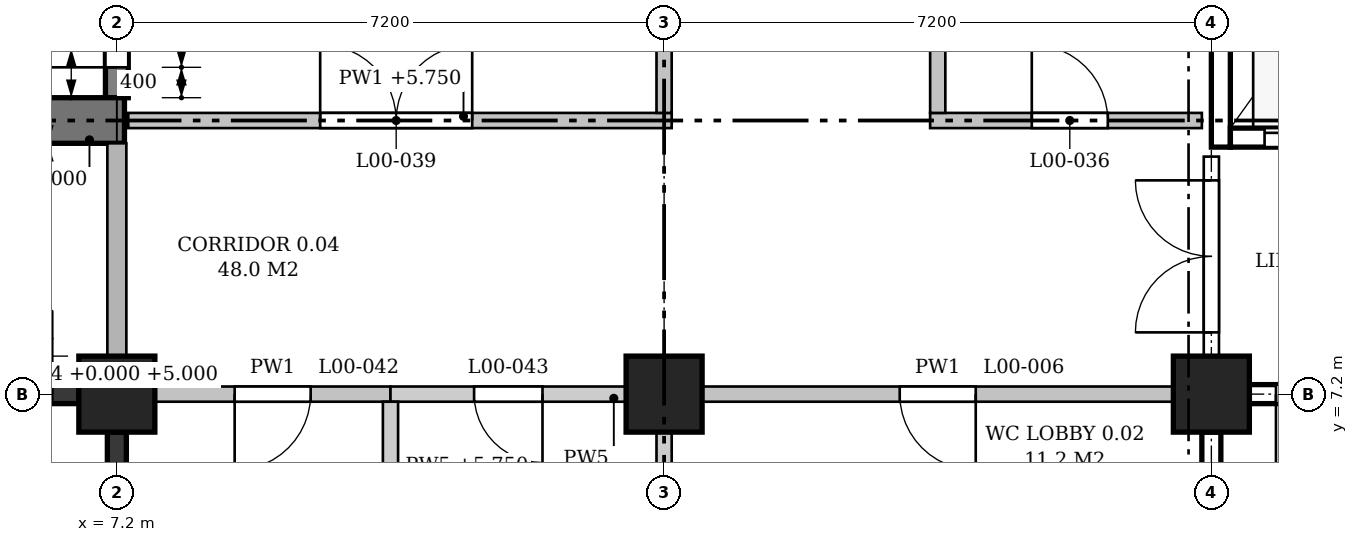
"""IFC4 building model, lengths in metres.
Left out: names, types, materials, properties, quantities, classifications, styles, units other than length and angle.
Written with IfcOpenShell. Run it as: python <this file> out.ifc"""

import sys

from ifc_helpers import new_model, si_unit, direction, frame, frame_2d, origin, origin_2d, place, context, subcontext, project, spatial, polyline, rectangle, outline, extrude, element, fill, save


model = new_model("IFC4")
c1 = context("Model", 3, precision=1e-05, world=origin(), true_north=direction((0.0, 1.0)))
c2 = subcontext(c1, "Body", "Model", "MODEL_VIEW")
j1 = project(units=[si_unit("LENGTHUNIT", "METRE"), si_unit("PLANEANGLEUNIT", "RADIAN")], contexts=[c1])
p1 = place(None, origin())
s1 = spatial("IfcSite", under=j1, at=p1, CompositionType="ELEMENT")
p2 = place(p1, origin())
s2 = spatial("IfcBuilding", under=s1, at=p2, CompositionType="ELEMENT")
p3 = place(p2, origin())
s3 = spatial("IfcBuildingStorey", under=s2, at=p3, CompositionType="ELEMENT", Elevation=0.0)
for number, where, z_axis, x_axis in (
    (1, (7.2, 7.2, 0.0), (0.0, 0.0, 1.0), (1.0, 0.0, 0.0)),
    (2, (14.4, 7.2, 0.0), (0.0, 0.0, 1.0), (1.0, 0.0, 0.0)),
    (3, (21.6, 7.2, 0.0), (0.0, 0.0, 1.0), (1.0, 0.0, 0.0)),
):
    element("IfcColumn", number, at=place(p3, frame(where, z_axis=z_axis, x_axis=x_axis)), inside=s3, PredefinedType="COLUMN", context=c2, shape_type="SweptSolid", body=[
        extrude(rectangle(XDim=1.0, YDim=1.0, at=origin_2d()), origin(), (0.0, 0.0, 1.0), 6.0),
    ])
p4 = place(p3, frame((7.2, 11.1, 0.0), z_axis=(0.0, 0.0, 1.0), x_axis=(0.0, 1.0, 0.0)))
e4 = element("IfcWall", 4, at=p4, inside=s3, PredefinedType="STANDARD", context=c2, shape_type="SweptSolid", body=[
    extrude(rectangle(XDim=2.8, YDim=0.3, at=frame_2d((1.4, 0.0))), origin(), (0.0, 0.0, 1.0), 5.0),
])
p5 = place(p4, frame((0.4, 0.0, 0.0)))
e5 = element("IfcOpeningElement", 5, at=p5, cuts=e4, PredefinedType="OPENING", context=c2, shape_type="SweptSolid", body=[
    extrude(outline(polyline([(0.0, 0.0), (2.0, 0.0), (2.0, 1.9), (1.0, 2.9), (0.0, 1.9), (0.0, 0.0)])), frame((0.0, 0.16, 0.0), z_axis=(0.0, -1.0, 0.0), x_axis=(1.0, 0.0, 0.0)), (0.0, 0.0, 1.0), 0.32),
])
p6 = place(p4, frame((0.65, 0.0, 3.15)))
e6 = element("IfcOpeningElement", 6, at=p6, cuts=e4, PredefinedType="OPENING", context=c2, shape_type="SweptSolid", body=[
    extrude(outline(polyline([(0.0, 0.0), (1.5, 0.0), (1.5, 1.05), (0.75, 1.8), (0.0, 1.05), (0.0, 0.0)])), frame((0.0, 0.16, 0.0), z_axis=(0.0, -1.0, 0.0), x_axis=(1.0, 0.0, 0.0)), (0.0, 0.0, 1.0), 0.32),
])
p7 = place(p3, frame((7.3, 10.8, 0.0), z_axis=(0.0, 0.0, 1.0), x_axis=(-1.0, 0.0, 0.0)))
e7 = element("IfcWall", 7, at=p7, inside=s3, PredefinedType="POLYGONAL", context=c2, shape_type="SweptSolid", body=[
    extrude(outline(polyline([(1.0, 0.0), (1.0, 5.25), (0.5, 6.0), (0.35, 6.0), (0.35, 5.0), (0.0, 5.0), (0.0, 0.0), (1.0, 0.0)])), frame((0.0, 0.3, 0.0), z_axis=(0.0, -1.0, 0.0), x_axis=(1.0, 0.0, 0.0)), (0.0, 0.0, 1.0), 0.6),
])
p8 = place(p3, frame((0.6, 7.2, 0.0), z_axis=(0.0, 0.0, 1.0), x_axis=(1.0, 0.0, 0.0)))
e8 = element("IfcWall", 8, at=p8, inside=s3, PredefinedType="SHEAR", context=c2, shape_type="SweptSolid", body=[
    extrude(rectangle(XDim=6.1, YDim=0.25, at=frame_2d((3.05, 0.0))), origin(), (0.0, 0.0, 1.0), 5.0),
])
p9 = place(p8, frame((4.65, 0.0, 0.0)))
e9 = element("IfcOpeningElement", 9, at=p9, cuts=e8, PredefinedType="OPENING", context=c2, shape_type="SweptSolid", body=[
    extrude(rectangle(XDim=1.1, YDim=2.1, at=frame_2d((0.55, 1.05))), frame((0.0, 0.135, 0.0), z_axis=(0.0, -1.0, 0.0), x_axis=(1.0, 0.0, 0.0)), (0.0, 0.0, 1.0), 0.27),
])
p10 = place(p3, frame((7.2, 0.5, 0.0), z_axis=(0.0, 0.0, 1.0), x_axis=(0.0, 1.0, 0.0)))
e10 = element("IfcWall", 10, at=p10, inside=s3, PredefinedType="SHEAR", context=c2, shape_type="SweptSolid", body=[
    extrude(rectangle(XDim=6.2, YDim=0.25, at=frame_2d((3.1, 0.0))), origin(), (0.0, 0.0, 1.0), 5.0),
])
p11 = place(p3, frame((22.1, 7.2, 0.0), z_axis=(0.0, 0.0, 1.0), x_axis=(1.0, 0.0, 0.0)))
e11 = element("IfcWall", 11, at=p11, inside=s3, PredefinedType="SHEAR", context=c2, shape_type="SweptSolid", body=[
    extrude(rectangle(XDim=6.2, YDim=0.25, at=frame_2d((3.1, 0.0))), origin(), (0.0, 0.0, 1.0), 5.0),
])
p12 = place(p11, frame((0.35, 0.0, 0.0)))
e12 = element("IfcOpeningElement", 12, at=p12, cuts=e11, PredefinedType="OPENING", context=c2, shape_type="SweptSolid", body=[
    extrude(rectangle(XDim=1.1, YDim=2.1, at=frame_2d((0.55, 1.05))), frame((0.0, 0.135, 0.0), z_axis=(0.0, -1.0, 0.0), x_axis=(1.0, 0.0, 0.0)), (0.0, 0.0, 1.0), 0.27),
])
p13 = place(p3, frame((21.6, 0.5, 0.0), z_axis=(0.0, 0.0, 1.0), x_axis=(0.0, 1.0, 0.0)))
e13 = element("IfcWall", 13, at=p13, inside=s3, PredefinedType="SHEAR", context=c2, shape_type="SweptSolid", body=[
    extrude(rectangle(XDim=6.2, YDim=0.25, at=frame_2d((3.1, 0.0))), origin(), (0.0, 0.0, 1.0), 5.0),
])
p14 = place(p3, frame((21.725, 10.45, -0.3), z_axis=(0.0, 0.0, 1.0), x_axis=(0.0, 1.0, 0.0)))
e14 = element("IfcWall", 14, at=p14, inside=s3, PredefinedType="SHEAR", context=c2, shape_type="SweptSolid", body=[
    extrude(rectangle(XDim=3.45, YDim=0.25, at=frame_2d((1.725, 0.0))), origin(), (0.0, 0.0, 1.0), 5.3),
])
p15 = place(p3, frame((21.85, 10.575, -0.3), z_axis=(0.0, 0.0, 1.0), x_axis=(1.0, 0.0, 0.0)))
e15 = element("IfcWall", 15, at=p15, inside=s3, PredefinedType="SHEAR", context=c2, shape_type="SweptSolid", body=[
    extrude(rectangle(XDim=2.0, YDim=0.25, at=frame_2d((1.0, 0.0))), origin(), (0.0, 0.0, 1.0), 6.05),
])
p16 = place(p15, frame((0.45, 0.0, 0.3)))
e16 = element("IfcOpeningElement", 16, at=p16, cuts=e15, PredefinedType="OPENING", context=c2, shape_type="SweptSolid", body=[
    extrude(rectangle(XDim=1.1, YDim=2.1, at=frame_2d((0.55, 1.05))), frame((0.0, 0.135, 0.0), z_axis=(0.0, -1.0, 0.0), x_axis=(1.0, 0.0, 0.0)), (0.0, 0.0, 1.0), 0.27),
])
p17 = place(p3, frame((7.7, 7.2, 0.0), z_axis=(0.0, 0.0, 1.0), x_axis=(1.0, 0.0, 0.0)))
e17 = element("IfcWall", 17, at=p17, inside=s3, PredefinedType="PARTITIONING", context=c2, shape_type="SweptSolid", body=[
    extrude(rectangle(XDim=3.1, YDim=0.2, at=frame_2d((1.55, 0.0))), origin(), (0.0, 0.0, 1.0), 5.0),
])
p18 = place(p17, frame((1.05, 0.0, 0.0)))
e18 = element("IfcOpeningElement", 18, at=p18, cuts=e17, PredefinedType="OPENING", context=c2, shape_type="SweptSolid", body=[
    extrude(rectangle(XDim=1.0, YDim=2.1, at=frame_2d((0.5, 1.05))), frame((0.0, 0.11, 0.0), z_axis=(0.0, -1.0, 0.0), x_axis=(1.0, 0.0, 0.0)), (0.0, 0.0, 1.0), 0.22),
])
p19 = place(p3, frame((10.8, 7.2, 0.0), z_axis=(0.0, 0.0, 1.0), x_axis=(1.0, 0.0, 0.0)))
e19 = element("IfcWall", 19, at=p19, inside=s3, PredefinedType="SOLIDWALL", context=c2, shape_type="SweptSolid", body=[
    extrude(rectangle(XDim=3.1, YDim=0.2, at=frame_2d((1.55, 0.0))), origin(), (0.0, 0.0, 1.0), 5.0),
])
p20 = place(p19, frame((1.1, 0.0, 0.0)))
e20 = element("IfcOpeningElement", 20, at=p20, cuts=e19, PredefinedType="OPENING", context=c2, shape_type="SweptSolid", body=[
    extrude(rectangle(XDim=0.9, YDim=2.1, at=frame_2d((0.45, 1.05))), frame((0.0, 0.11, 0.0), z_axis=(0.0, -1.0, 0.0), x_axis=(1.0, 0.0, 0.0)), (0.0, 0.0, 1.0), 0.22),
])
p21 = place(p3, frame((14.9, 7.2, 0.0), z_axis=(0.0, 0.0, 1.0), x_axis=(1.0, 0.0, 0.0)))
e21 = element("IfcWall", 21, at=p21, inside=s3, PredefinedType="PARTITIONING", context=c2, shape_type="SweptSolid", body=[
    extrude(rectangle(XDim=6.2, YDim=0.2, at=frame_2d((3.1, 0.0))), origin(), (0.0, 0.0, 1.0), 5.0),
])
p22 = place(p21, frame((2.6, 0.0, 0.0)))
e22 = element("IfcOpeningElement", 22, at=p22, cuts=e21, PredefinedType="OPENING", context=c2, shape_type="SweptSolid", body=[
    extrude(rectangle(XDim=1.0, YDim=2.1, at=frame_2d((0.5, 1.05))), frame((0.0, 0.11, 0.0), z_axis=(0.0, -1.0, 0.0), x_axis=(1.0, 0.0, 0.0)), (0.0, 0.0, 1.0), 0.22),
])
p23 = place(p3, frame((7.35, 10.8, 0.0), z_axis=(0.0, 0.0, 1.0), x_axis=(1.0, 0.0, 0.0)))
e23 = element("IfcWall", 23, at=p23, inside=s3, PredefinedType="PARTITIONING", context=c2, shape_type="SweptSolid", body=[
    extrude(outline(polyline([(0.0, 0.0), (7.15, 0.0), (7.15, 5.0), (6.8, 5.0), (6.8, 5.75), (0.1, 5.75), (0.1, 5.0), (0.0, 5.0), (0.0, 0.0)])), frame((0.0, 0.1, 0.0), z_axis=(0.0, -1.0, 0.0), x_axis=(1.0, 0.0, 0.0)), (0.0, 0.0, 1.0), 0.2),
])
p24 = place(p23, frame((2.525, 0.0, 0.0)))
e24 = element("IfcOpeningElement", 24, at=p24, cuts=e23, PredefinedType="OPENING", context=c2, shape_type="SweptSolid", body=[
    extrude(rectangle(XDim=2.0, YDim=2.1, at=frame_2d((1.0, 1.05))), frame((0.0, 0.11, 0.0), z_axis=(0.0, -1.0, 0.0), x_axis=(1.0, 0.0, 0.0)), (0.0, 0.0, 1.0), 0.22),
])
p25 = place(p3, frame((17.9, 10.8, 0.0), z_axis=(0.0, 0.0, 1.0), x_axis=(1.0, 0.0, 0.0)))
e25 = element("IfcWall", 25, at=p25, inside=s3, PredefinedType="PARTITIONING", context=c2, shape_type="SweptSolid", body=[
    extrude(outline(polyline([(0.0, 0.0), (3.575, 0.0), (3.575, 5.0), (3.45, 5.0), (3.45, 5.75), (0.0, 5.75), (0.0, 0.0)])), frame((0.0, 0.1, 0.0), z_axis=(0.0, -1.0, 0.0), x_axis=(1.0, 0.0, 0.0)), (0.0, 0.0, 1.0), 0.2),
])
p26 = place(p25, frame((1.338, 0.0, 0.0)))
e26 = element("IfcOpeningElement", 26, at=p26, cuts=e25, PredefinedType="OPENING", context=c2, shape_type="SweptSolid", body=[
    extrude(rectangle(XDim=1.0, YDim=2.1, at=frame_2d((0.5, 1.05))), frame((0.0, 0.11, 0.0), z_axis=(0.0, -1.0, 0.0), x_axis=(1.0, 0.0, 0.0)), (0.0, 0.0, 1.0), 0.22),
])
p27 = place(p3, frame((10.8, 5.4, 0.0), z_axis=(0.0, 0.0, 1.0), x_axis=(0.0, 1.0, 0.0)))
e27 = element("IfcWall", 27, at=p27, inside=s3, PredefinedType="SOLIDWALL", context=c2, shape_type="SweptSolid", body=[
    extrude(outline(polyline([(0.0, 0.0), (1.7, 0.0), (1.7, 5.0), (1.55, 5.0), (1.55, 5.75), (0.0, 5.75), (0.0, 0.0)])), frame((0.0, 0.1, 0.0), z_axis=(0.0, -1.0, 0.0), x_axis=(1.0, 0.0, 0.0)), (0.0, 0.0, 1.0), 0.2),
])
p28 = place(p3, frame((14.4, 5.5, 0.0), z_axis=(0.0, 0.0, 1.0), x_axis=(0.0, 1.0, 0.0)))
e28 = element("IfcWall", 28, at=p28, inside=s3, PredefinedType="SOLIDWALL", context=c2, shape_type="SweptSolid", body=[
    extrude(rectangle(XDim=1.2, YDim=0.2, at=frame_2d((0.6, 0.0))), origin(), (0.0, 0.0, 1.0), 5.0),
])
p29 = place(p3, frame((14.4, 10.9, 0.0), z_axis=(0.0, 0.0, 1.0), x_axis=(0.0, 1.0, 0.0)))
e29 = element("IfcWall", 29, at=p29, inside=s3, PredefinedType="PARTITIONING", context=c2, shape_type="SweptSolid", body=[
    extrude(rectangle(XDim=3.0, YDim=0.2, at=frame_2d((1.5, 0.0))), origin(), (0.0, 0.0, 1.0), 5.0),
])
p30 = place(p3, frame((18.0, 10.9, 0.0), z_axis=(0.0, 0.0, 1.0), x_axis=(0.0, 1.0, 0.0)))
e30 = element("IfcWall", 30, at=p30, inside=s3, PredefinedType="PARTITIONING", context=c2, shape_type="SweptSolid", body=[
    extrude(outline(polyline([(0.0, 0.0), (10.6, 0.0), (10.6, 5.15), (10.45, 5.15), (10.45, 5.75), (3.75, 5.75), (3.75, 5.0), (3.25, 5.0), (3.25, 5.75), (0.0, 5.75), (0.0, 0.0)])), frame((0.0, 0.1, 0.0), z_axis=(0.0, -1.0, 0.0), x_axis=(1.0, 0.0, 0.0)), (0.0, 0.0, 1.0), 0.2),
])
p31 = place(p30, frame((4.8, 0.0, 0.0)))
e31 = element("IfcOpeningElement", 31, at=p31, cuts=e30, PredefinedType="OPENING", context=c2, shape_type="SweptSolid", body=[
    extrude(rectangle(XDim=1.0, YDim=2.1, at=frame_2d((0.5, 1.05))), frame((0.0, 0.11, 0.0), z_axis=(0.0, -1.0, 0.0), x_axis=(1.0, 0.0, 0.0)), (0.0, 0.0, 1.0), 0.22),
])
p32 = place(p30, frame((8.35, 0.0, 0.0)))
e32 = element("IfcOpeningElement", 32, at=p32, cuts=e30, PredefinedType="OPENING", context=c2, shape_type="SweptSolid", body=[
    extrude(rectangle(XDim=1.0, YDim=2.1, at=frame_2d((0.5, 1.05))), frame((0.0, 0.11, 0.0), z_axis=(0.0, -1.0, 0.0), x_axis=(1.0, 0.0, 0.0)), (0.0, 0.0, 1.0), 0.22),
])
p33 = place(p3, frame((21.6, 7.7, 0.0), z_axis=(0.0, 0.0, 1.0), x_axis=(0.0, 1.0, 0.0)))
e33 = element("IfcWall", 33, at=p33, inside=s3, PredefinedType="PARTITIONING", context=c2, shape_type="SweptSolid", body=[
    extrude(rectangle(XDim=2.625, YDim=0.2, at=frame_2d((1.312, 0.0))), origin(), (0.0, 0.0, 1.0), 5.0),
])
p34 = place(p33, frame((0.312, 0.0, 0.0)))
e34 = element("IfcOpeningElement", 34, at=p34, cuts=e33, PredefinedType="OPENING", context=c2, shape_type="SweptSolid", body=[
    extrude(rectangle(XDim=2.0, YDim=2.4, at=frame_2d((1.0, 1.2))), frame((0.0, 0.11, 0.0), z_axis=(0.0, -1.0, 0.0), x_axis=(1.0, 0.0, 0.0)), (0.0, 0.0, 1.0), 0.22),
])
p35 = place(p5, origin())
e35 = element("IfcDoor", 35, at=p35, inside=s3, OperationType="DOUBLE_DOOR_SINGLE_SWING", PredefinedType="DOOR", context=c2, shape_type="SweptSolid", body=[
    extrude(outline(polyline([(0.0, 0.0), (2.0, 0.0), (2.0, 1.9), (1.0, 2.9), (0.0, 1.9), (0.0, 0.0)])), frame((0.0, 0.025, 0.0), z_axis=(0.0, -1.0, 0.0), x_axis=(1.0, 0.0, 0.0)), (0.0, 0.0, 1.0), 0.05),
])
fill(e5, e35)
p36 = place(p12, frame((1.1, 0.0, 0.0), z_axis=(0.0, 0.0, 1.0), x_axis=(-1.0, 0.0, 0.0)))
e36 = element("IfcDoor", 36, at=p36, inside=s3, OperationType="SINGLE_SWING_RIGHT", PredefinedType="DOOR", context=c2, shape_type="SweptSolid", body=[
    extrude(rectangle(XDim=1.1, YDim=2.1, at=frame_2d((0.55, 1.05))), frame((0.0, 0.025, 0.0), z_axis=(0.0, -1.0, 0.0), x_axis=(1.0, 0.0, 0.0)), (0.0, 0.0, 1.0), 0.05),
])
fill(e12, e36)
p37 = place(p16, origin())
e37 = element("IfcDoor", 37, at=p37, inside=s3, OperationType="SLIDING_TO_LEFT", PredefinedType="DOOR", context=c2, shape_type="SweptSolid", body=[
    extrude(rectangle(XDim=1.1, YDim=2.1, at=frame_2d((0.55, 1.05))), frame((0.0, 0.025, 0.0), z_axis=(0.0, -1.0, 0.0), x_axis=(1.0, 0.0, 0.0)), (0.0, 0.0, 1.0), 0.05),
])
fill(e16, e37)
p38 = place(p34, origin())
e38 = element("IfcDoor", 38, at=p38, inside=s3, OperationType="DOUBLE_DOOR_SINGLE_SWING", PredefinedType="DOOR", context=c2, shape_type="SweptSolid", body=[
    extrude(rectangle(XDim=2.0, YDim=2.4, at=frame_2d((1.0, 1.2))), frame((0.0, 0.025, 0.0), z_axis=(0.0, -1.0, 0.0), x_axis=(1.0, 0.0, 0.0)), (0.0, 0.0, 1.0), 0.05),
])
fill(e34, e38)
p39 = place(p22, frame((1.0, 0.0, 0.0), z_axis=(0.0, 0.0, 1.0), x_axis=(-1.0, 0.0, 0.0)))
e39 = element("IfcDoor", 39, at=p39, inside=s3, OperationType="SINGLE_SWING_LEFT", PredefinedType="DOOR", context=c2, shape_type="SweptSolid", body=[
    extrude(rectangle(XDim=1.0, YDim=2.1, at=frame_2d((0.5, 1.05))), frame((0.0, 0.025, 0.0), z_axis=(0.0, -1.0, 0.0), x_axis=(1.0, 0.0, 0.0)), (0.0, 0.0, 1.0), 0.05),
])
fill(e22, e39)
p40 = place(p26, origin())
e40 = element("IfcDoor", 40, at=p40, inside=s3, OperationType="SINGLE_SWING_LEFT", PredefinedType="DOOR", context=c2, shape_type="SweptSolid", body=[
    extrude(rectangle(XDim=1.0, YDim=2.1, at=frame_2d((0.5, 1.05))), frame((0.0, 0.025, 0.0), z_axis=(0.0, -1.0, 0.0), x_axis=(1.0, 0.0, 0.0)), (0.0, 0.0, 1.0), 0.05),
])
fill(e26, e40)
p41 = place(p24, origin())
e41 = element("IfcDoor", 41, at=p41, inside=s3, OperationType="DOUBLE_DOOR_SINGLE_SWING", PredefinedType="DOOR", context=c2, shape_type="SweptSolid", body=[
    extrude(rectangle(XDim=2.0, YDim=2.1, at=frame_2d((1.0, 1.05))), frame((0.0, 0.025, 0.0), z_axis=(0.0, -1.0, 0.0), x_axis=(1.0, 0.0, 0.0)), (0.0, 0.0, 1.0), 0.05),
])
fill(e24, e41)
p42 = place(p18, frame((1.0, 0.0, 0.0), z_axis=(0.0, 0.0, 1.0), x_axis=(-1.0, 0.0, 0.0)))
e42 = element("IfcDoor", 42, at=p42, inside=s3, OperationType="SINGLE_SWING_RIGHT", PredefinedType="DOOR", context=c2, shape_type="SweptSolid", body=[
    extrude(rectangle(XDim=1.0, YDim=2.1, at=frame_2d((0.5, 1.05))), frame((0.0, 0.025, 0.0), z_axis=(0.0, -1.0, 0.0), x_axis=(1.0, 0.0, 0.0)), (0.0, 0.0, 1.0), 0.05),
])
fill(e18, e42)
p43 = place(p20, frame((0.9, 0.0, 0.0), z_axis=(0.0, 0.0, 1.0), x_axis=(-1.0, 0.0, 0.0)))
e43 = element("IfcDoor", 43, at=p43, inside=s3, OperationType="SINGLE_SWING_LEFT", PredefinedType="DOOR", context=c2, shape_type="SweptSolid", body=[
    extrude(rectangle(XDim=0.9, YDim=2.1, at=frame_2d((0.45, 1.05))), frame((0.0, 0.025, 0.0), z_axis=(0.0, -1.0, 0.0), x_axis=(1.0, 0.0, 0.0)), (0.0, 0.0, 1.0), 0.05),
])
fill(e20, e43)
save(model, sys.argv[1])
